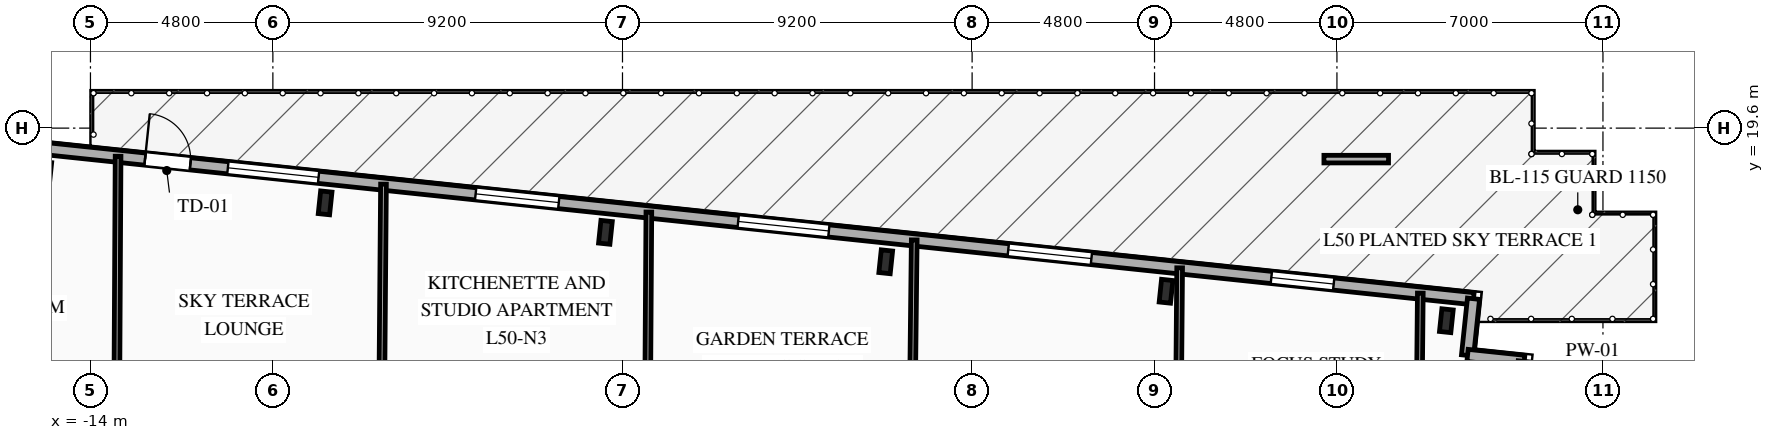
"""IFC4 building model, lengths in metres.
Left out: names, types, materials, properties, quantities, classifications, styles, units other than length and angle.
Written with IfcOpenShell. Run it as: python <this file> out.ifc"""

import sys

from ifc_helpers import new_model, si_unit, direction, frame, frame_2d, origin, origin_2d, place, context, subcontext, project, spatial, rectangle, i_section, extrude, element, fill, save


model = new_model("IFC4")
c1 = context("Model", 3, precision=1e-05, world=origin(), true_north=direction((0.0, 1.0)))
c2 = subcontext(c1, "Body", "Model", "MODEL_VIEW")
j1 = project(units=[si_unit("LENGTHUNIT", "METRE"), si_unit("PLANEANGLEUNIT", "RADIAN")], contexts=[c1])
p1 = place(None, origin())
s1 = spatial("IfcSite", under=j1, at=p1, CompositionType="ELEMENT")
p2 = place(p1, origin())
s2 = spatial("IfcBuilding", under=s1, at=p2, CompositionType="ELEMENT")
p3 = place(p2, frame((0.0, 0.0, 179.65)))
s3 = spatial("IfcBuildingStorey", under=s2, at=p3, CompositionType="ELEMENT", Elevation=179.65)
for number, where, z_axis, x_axis in (
    (1, (21.679, 14.532, 0.0), (0.0, 0.0, 1.0), (0.995, -0.105, 0.0)),
    (2, (14.303, 15.308, 0.0), (0.0, 0.0, 1.0), (0.995, -0.105, 0.0)),
    (3, (6.927, 16.083, 0.0), (0.0, 0.0, 1.0), (0.995, -0.105, 0.0)),
    (4, (-0.449, 16.858, 0.0), (0.0, 0.0, 1.0), (0.995, -0.105, 0.0)),
    (5, (-7.825, 17.634, 0.0), (0.0, 0.0, 1.0), (0.995, -0.105, 0.0)),
):
    element("IfcColumn", number, at=place(p3, frame(where, z_axis=z_axis, x_axis=x_axis)), inside=s3, PredefinedType="COLUMN", context=c2, shape_type="SweptSolid", body=[
        extrude(i_section(OverallWidth=0.3, OverallDepth=0.6, WebThickness=0.015, FlangeThickness=0.03, FilletRadius=0.027, at=origin_2d()), origin(), (0.0, 0.0, 1.0), 3.35),
    ])
p4 = place(p3, frame((-23.156, 19.898, 0.0), z_axis=(0.0, 0.0, 1.0), x_axis=(0.994522001802, -0.104527450613, 0.0)))
e6 = element("IfcWall", 6, at=p4, inside=s3, PredefinedType="SOLIDWALL", context=c2, shape_type="SweptSolid", body=[
    extrude(rectangle(XDim=45.8, YDim=0.32, at=frame_2d((22.9, 0.0))), origin(), (0.0, 0.0, 1.0), 3.04),
])
p5 = place(p4, frame((10.65, 0.0, 0.0)))
e7 = element("IfcOpeningElement", 7, at=p5, cuts=e6, PredefinedType="OPENING", context=c2, shape_type="SweptSolid", body=[
    extrude(rectangle(XDim=1.2, YDim=2.2, at=frame_2d((0.6, 1.1))), frame((0.0, 0.17, 0.0), z_axis=(0.0, -1.0, 0.0), x_axis=(1.0, 0.0, 0.0)), (0.0, 0.0, 1.0), 0.34),
])
p6 = place(p4, frame((5.34, 0.0, 0.85)))
e8 = element("IfcOpeningElement", 8, at=p6, cuts=e6, PredefinedType="OPENING", context=c2, shape_type="SweptSolid", body=[
    extrude(rectangle(XDim=1.65, YDim=1.85, at=frame_2d((0.825, 0.925))), frame((0.0, 0.17, 0.0), z_axis=(0.0, -1.0, 0.0), x_axis=(1.0, 0.0, 0.0)), (0.0, 0.0, 1.0), 0.34),
])
p7 = place(p4, frame((12.842, 0.0, 0.85)))
e9 = element("IfcOpeningElement", 9, at=p7, cuts=e6, PredefinedType="OPENING", context=c2, shape_type="SweptSolid", body=[
    extrude(rectangle(XDim=2.4, YDim=1.95, at=frame_2d((1.2, 0.975))), frame((0.0, 0.17, 0.0), z_axis=(0.0, -1.0, 0.0), x_axis=(1.0, 0.0, 0.0)), (0.0, 0.0, 1.0), 0.34),
])
p8 = place(p4, frame((19.398, 0.0, 0.85)))
e10 = element("IfcOpeningElement", 10, at=p8, cuts=e6, PredefinedType="OPENING", context=c2, shape_type="SweptSolid", body=[
    extrude(rectangle(XDim=2.2, YDim=1.85, at=frame_2d((1.1, 0.925))), frame((0.0, 0.17, 0.0), z_axis=(0.0, -1.0, 0.0), x_axis=(1.0, 0.0, 0.0)), (0.0, 0.0, 1.0), 0.34),
])
p9 = place(p4, frame((26.344, 0.0, 0.85)))
e11 = element("IfcOpeningElement", 11, at=p9, cuts=e6, PredefinedType="OPENING", context=c2, shape_type="SweptSolid", body=[
    extrude(rectangle(XDim=2.4, YDim=1.95, at=frame_2d((1.2, 0.975))), frame((0.0, 0.17, 0.0), z_axis=(0.0, -1.0, 0.0), x_axis=(1.0, 0.0, 0.0)), (0.0, 0.0, 1.0), 0.34),
])
p10 = place(p4, frame((33.49, 0.0, 0.85)))
e12 = element("IfcOpeningElement", 12, at=p10, cuts=e6, PredefinedType="OPENING", context=c2, shape_type="SweptSolid", body=[
    extrude(rectangle(XDim=2.2, YDim=1.85, at=frame_2d((1.1, 0.925))), frame((0.0, 0.17, 0.0), z_axis=(0.0, -1.0, 0.0), x_axis=(1.0, 0.0, 0.0)), (0.0, 0.0, 1.0), 0.34),
])
p11 = place(p4, frame((40.451, 0.0, 0.85)))
e13 = element("IfcOpeningElement", 13, at=p11, cuts=e6, PredefinedType="OPENING", context=c2, shape_type="SweptSolid", body=[
    extrude(rectangle(XDim=1.65, YDim=1.85, at=frame_2d((0.825, 0.925))), frame((0.0, 0.17, 0.0), z_axis=(0.0, -1.0, 0.0), x_axis=(1.0, 0.0, 0.0)), (0.0, 0.0, 1.0), 0.34),
])
p12 = place(p3, frame((22.393, 15.111, 0.0), z_axis=(0.0, 0.0, 1.0), x_axis=(-0.104481464157, -0.994526834051, 0.0)))
e14 = element("IfcWall", 14, at=p12, inside=s3, PredefinedType="SOLIDWALL", context=c2, shape_type="SweptSolid", body=[
    extrude(rectangle(XDim=1.5, YDim=0.32, at=frame_2d((0.75, 0.0))), origin(), (0.0, 0.0, 1.0), 3.04),
])
p13 = place(p3, frame((22.237, 13.619, 0.0), z_axis=(0.0, 0.0, 1.0), x_axis=(0.994525057048, -0.104498377516, 0.0)))
e15 = element("IfcWall", 15, at=p13, inside=s3, PredefinedType="SOLIDWALL", context=c2, shape_type="SweptSolid", body=[
    extrude(rectangle(XDim=1.5, YDim=0.32, at=frame_2d((0.75, 0.0))), origin(), (0.0, 0.0, 1.0), 3.04),
])
p14 = place(p3, frame((18.458, 18.784, 0.0), z_axis=(0.0, 0.0, 1.0), x_axis=(1.0, 0.0, 0.0)))
e16 = element("IfcWall", 16, at=p14, inside=s3, PredefinedType="USERDEFINED", context=c2, shape_type="SweptSolid", body=[
    extrude(rectangle(XDim=1.7, YDim=0.2, at=frame_2d((0.85, 0.0))), origin(), (0.0, 0.0, 1.0), 0.45),
])
p15 = place(p3, frame((20.95, 10.65, 0.0), z_axis=(0.0, 0.0, 1.0), x_axis=(0.009535990233, 0.999954531411, 0.0)))
e17 = element("IfcWall", 17, at=p15, inside=s3, PredefinedType="PARTITIONING", context=c2, shape_type="SweptSolid", body=[
    extrude(rectangle(XDim=4.608, YDim=0.15, at=frame_2d((2.304, 0.0))), origin(), (0.0, 0.0, 1.0), 2.665),
])
p16 = place(p3, frame((-13.273, 18.86, 0.0), z_axis=(0.0, 0.0, 1.0), x_axis=(-0.005323028044, -0.999985832586, 0.0)))
e18 = element("IfcWall", 18, at=p16, inside=s3, PredefinedType="PARTITIONING", context=c2, shape_type="SweptSolid", body=[
    extrude(rectangle(XDim=8.21, YDim=0.15, at=frame_2d((4.105, 0.0))), origin(), (0.0, 0.0, 1.0), 3.04),
])
p17 = place(p3, frame((-6.289, 18.125, 0.0), z_axis=(0.0, 0.0, 1.0), x_axis=(-0.008251678897, -0.999965954318, 0.0)))
e19 = element("IfcWall", 19, at=p17, inside=s3, PredefinedType="PARTITIONING", context=c2, shape_type="SweptSolid", body=[
    extrude(rectangle(XDim=5.326, YDim=0.15, at=frame_2d((2.663, 0.0))), origin(), (0.0, 0.0, 1.0), 3.04),
])
p18 = place(p3, frame((0.694, 17.392, 0.0), z_axis=(0.0, 0.0, 1.0), x_axis=(-0.0065182942, -0.999978755695, 0.0)))
e20 = element("IfcWall", 20, at=p18, inside=s3, PredefinedType="PARTITIONING", context=c2, shape_type="SweptSolid", body=[
    extrude(rectangle(XDim=6.742, YDim=0.15, at=frame_2d((3.371, 0.0))), origin(), (0.0, 0.0, 1.0), 3.04),
])
p19 = place(p3, frame((7.677, 16.658, 0.0), z_axis=(0.0, 0.0, 1.0), x_axis=(-0.01139094499, -0.999935121081, 0.0)))
e21 = element("IfcWall", 21, at=p19, inside=s3, PredefinedType="PARTITIONING", context=c2, shape_type="SweptSolid", body=[
    extrude(rectangle(XDim=3.858, YDim=0.15, at=frame_2d((1.929, 0.0))), origin(), (0.0, 0.0, 1.0), 2.665),
])
p20 = place(p3, frame((14.661, 15.924, 0.0), z_axis=(0.0, 0.0, 1.0), x_axis=(-0.008332658252, -0.999965282801, 0.0)))
e22 = element("IfcWall", 22, at=p20, inside=s3, PredefinedType="PARTITIONING", context=c2, shape_type="SweptSolid", body=[
    extrude(rectangle(XDim=5.274, YDim=0.15, at=frame_2d((2.637, 0.0))), origin(), (0.0, 0.0, 1.0), 3.04),
])
p21 = place(p5, origin())
e23 = element("IfcDoor", 23, at=p21, inside=s3, OperationType="SINGLE_SWING_LEFT", PredefinedType="DOOR", context=c2, shape_type="SweptSolid", body=[
    extrude(rectangle(XDim=1.2, YDim=2.2, at=frame_2d((0.6, 1.1))), frame((0.0, 0.025, 0.0), z_axis=(0.0, -1.0, 0.0), x_axis=(1.0, 0.0, 0.0)), (0.0, 0.0, 1.0), 0.05),
])
fill(e7, e23)
p22 = place(p7, origin())
e24 = element("IfcWindow", 24, at=p22, inside=s3, PartitioningType="SINGLE_PANEL", PredefinedType="WINDOW", context=c2, shape_type="SweptSolid", body=[
    extrude(rectangle(XDim=2.4, YDim=1.95, at=frame_2d((1.2, 0.975))), frame((0.0, 0.03, 0.0), z_axis=(0.0, -1.0, 0.0), x_axis=(1.0, 0.0, 0.0)), (0.0, 0.0, 1.0), 0.06),
])
fill(e9, e24)
p23 = place(p8, origin())
e25 = element("IfcWindow", 25, at=p23, inside=s3, PartitioningType="SINGLE_PANEL", PredefinedType="WINDOW", context=c2, shape_type="SweptSolid", body=[
    extrude(rectangle(XDim=2.2, YDim=1.85, at=frame_2d((1.1, 0.925))), frame((0.0, 0.03, 0.0), z_axis=(0.0, -1.0, 0.0), x_axis=(1.0, 0.0, 0.0)), (0.0, 0.0, 1.0), 0.06),
])
fill(e10, e25)
p24 = place(p9, origin())
e26 = element("IfcWindow", 26, at=p24, inside=s3, PartitioningType="SINGLE_PANEL", PredefinedType="WINDOW", context=c2, shape_type="SweptSolid", body=[
    extrude(rectangle(XDim=2.4, YDim=1.95, at=frame_2d((1.2, 0.975))), frame((0.0, 0.03, 0.0), z_axis=(0.0, -1.0, 0.0), x_axis=(1.0, 0.0, 0.0)), (0.0, 0.0, 1.0), 0.06),
])
fill(e11, e26)
p25 = place(p10, origin())
e27 = element("IfcWindow", 27, at=p25, inside=s3, PartitioningType="SINGLE_PANEL", PredefinedType="WINDOW", context=c2, shape_type="SweptSolid", body=[
    extrude(rectangle(XDim=2.2, YDim=1.85, at=frame_2d((1.1, 0.925))), frame((0.0, 0.03, 0.0), z_axis=(0.0, -1.0, 0.0), x_axis=(1.0, 0.0, 0.0)), (0.0, 0.0, 1.0), 0.06),
])
fill(e12, e27)
p26 = place(p11, origin())
e28 = element("IfcWindow", 28, at=p26, inside=s3, PartitioningType="SINGLE_PANEL", PredefinedType="WINDOW", context=c2, shape_type="SweptSolid", body=[
    extrude(rectangle(XDim=1.65, YDim=1.85, at=frame_2d((0.825, 0.925))), frame((0.0, 0.03, 0.0), z_axis=(0.0, -1.0, 0.0), x_axis=(1.0, 0.0, 0.0)), (0.0, 0.0, 1.0), 0.06),
])
fill(e13, e28)
save(model, sys.argv[1])
